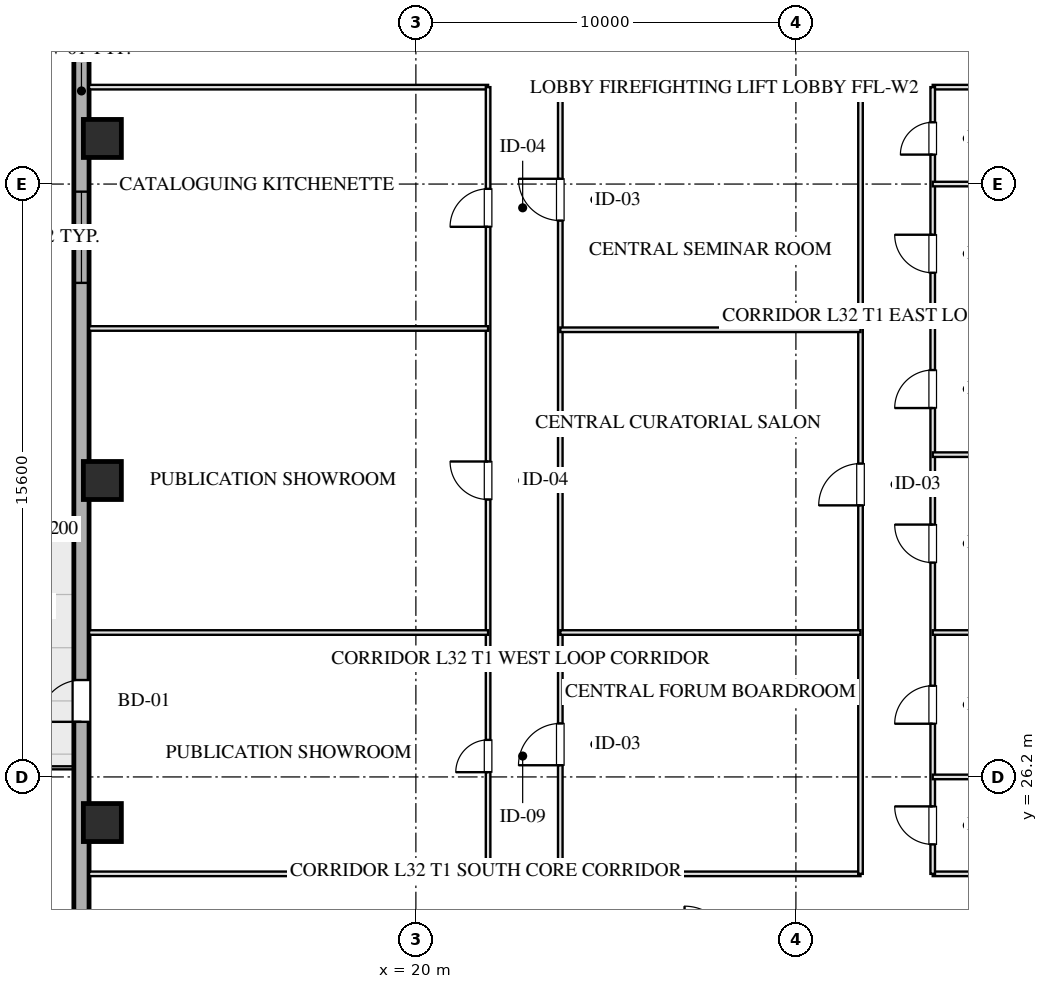
"""IFC4 building model, lengths in metres.
Left out: names, types, materials, properties, quantities, classifications, styles, units other than length and angle.
Written with IfcOpenShell. Run it as: python <this file> out.ifc"""

import sys

from ifc_helpers import new_model, si_unit, direction, frame, frame_2d, origin, origin_2d, place, context, subcontext, project, spatial, rectangle, hollow_rectangle, extrude, element, fill, save


model = new_model("IFC4")
c1 = context("Model", 3, precision=1e-05, world=origin(), true_north=direction((0.0, 1.0)))
c2 = subcontext(c1, "Body", "Model", "MODEL_VIEW")
j1 = project(units=[si_unit("LENGTHUNIT", "METRE"), si_unit("PLANEANGLEUNIT", "RADIAN")], contexts=[c1])
p1 = place(None, origin())
s1 = spatial("IfcSite", under=j1, at=p1, CompositionType="ELEMENT")
p2 = place(p1, origin())
s2 = spatial("IfcBuilding", under=s1, at=p2, CompositionType="ELEMENT")
p3 = place(p2, frame((0.0, 0.0, 124.2)))
s3 = spatial("IfcBuildingStorey", under=s2, at=p3, CompositionType="ELEMENT", Elevation=124.2)
for number, where, z_axis, x_axis in (
    (1, (11.75, 25.0, 0.0), (0.0, 0.0, 1.0), (1.0, 0.0, 0.0)),
    (2, (11.75, 34.0, 0.0), (0.0, 0.0, 1.0), (1.0, 0.0, 0.0)),
    (3, (11.75, 43.0, 0.0), (0.0, 0.0, 1.0), (1.0, 0.0, 0.0)),
):
    element("IfcColumn", number, at=place(p3, frame(where, z_axis=z_axis, x_axis=x_axis)), inside=s3, PredefinedType="COLUMN", context=c2, shape_type="SweptSolid", body=[
        extrude(hollow_rectangle(XDim=1.0, YDim=1.0, WallThickness=0.036, at=origin_2d()), origin(), (0.0, 0.0, 1.0), 3.451),
    ])
p4 = place(p3, frame((11.2, 9.0, 0.0), z_axis=(0.0, 0.0, 1.0), x_axis=(0.0, 1.0, 0.0)))
e4 = element("IfcWall", 4, at=p4, inside=s3, PredefinedType="SOLIDWALL", context=c2, shape_type="SweptSolid", body=[
    extrude(rectangle(XDim=50.0, YDim=0.4, at=frame_2d((25.0, 0.0))), origin(), (0.0, 0.0, 1.0), 2.61),
])
p5 = place(p4, frame((30.2, 0.0, 0.75)))
e5 = element("IfcOpeningElement", 5, at=p5, cuts=e4, PredefinedType="OPENING", context=c2, shape_type="SweptSolid", body=[
    extrude(rectangle(XDim=2.4, YDim=1.46, at=frame_2d((1.2, 0.73))), frame((0.0, 0.21, 0.0), z_axis=(0.0, -1.0, 0.0), x_axis=(1.0, 0.0, 0.0)), (0.0, 0.0, 1.0), 0.42),
])
p6 = place(p4, frame((18.65, 0.0, 0.0)))
e6 = element("IfcOpeningElement", 6, at=p6, cuts=e4, PredefinedType="OPENING", context=c2, shape_type="SweptSolid", body=[
    extrude(rectangle(XDim=1.1, YDim=2.15, at=frame_2d((0.55, 1.075))), frame((0.0, 0.21, 0.0), z_axis=(0.0, -1.0, 0.0), x_axis=(1.0, 0.0, 0.0)), (0.0, 0.0, 1.0), 0.42),
])
p7 = place(p3, frame((11.4, 23.65, 0.0), z_axis=(0.0, 0.0, 1.0), x_axis=(1.0, 0.0, 0.0)))
e7 = element("IfcWall", 7, at=p7, inside=s3, PredefinedType="PARTITIONING", context=c2, shape_type="SweptSolid", body=[
    extrude(rectangle(XDim=10.5, YDim=0.12, at=frame_2d((5.25, 0.0))), origin(), (0.0, 0.0, 1.0), 3.175),
])
p8 = place(p3, frame((23.8, 23.65, 0.0), z_axis=(0.0, 0.0, 1.0), x_axis=(1.0, 0.0, 0.0)))
e8 = element("IfcWall", 8, at=p8, inside=s3, PredefinedType="PARTITIONING", context=c2, shape_type="SweptSolid", body=[
    extrude(rectangle(XDim=7.9, YDim=0.12, at=frame_2d((3.95, 0.0))), origin(), (0.0, 0.0, 1.0), 3.175),
])
p9 = place(p3, frame((33.6, 23.65, 0.0), z_axis=(0.0, 0.0, 1.0), x_axis=(1.0, 0.0, 0.0)))
e9 = element("IfcWall", 9, at=p9, inside=s3, PredefinedType="PARTITIONING", context=c2, shape_type="SweptSolid", body=[
    extrude(rectangle(XDim=15.0, YDim=0.12, at=frame_2d((7.5, 0.0))), origin(), (0.0, 0.0, 1.0), 3.175),
])
p10 = place(p3, frame((11.4, 44.35, 0.0), z_axis=(0.0, 0.0, 1.0), x_axis=(1.0, 0.0, 0.0)))
e10 = element("IfcWall", 10, at=p10, inside=s3, PredefinedType="PARTITIONING", context=c2, shape_type="SweptSolid", body=[
    extrude(rectangle(XDim=10.5, YDim=0.12, at=frame_2d((5.25, 0.0))), origin(), (0.0, 0.0, 1.0), 3.175),
])
p11 = place(p3, frame((23.8, 44.35, 0.0), z_axis=(0.0, 0.0, 1.0), x_axis=(1.0, 0.0, 0.0)))
e11 = element("IfcWall", 11, at=p11, inside=s3, PredefinedType="PARTITIONING", context=c2, shape_type="SweptSolid", body=[
    extrude(rectangle(XDim=7.9, YDim=0.12, at=frame_2d((3.95, 0.0))), origin(), (0.0, 0.0, 1.0), 3.175),
])
p12 = place(p3, frame((33.6, 44.35, 0.0), z_axis=(0.0, 0.0, 1.0), x_axis=(1.0, 0.0, 0.0)))
e12 = element("IfcWall", 12, at=p12, inside=s3, PredefinedType="PARTITIONING", context=c2, shape_type="SweptSolid", body=[
    extrude(rectangle(XDim=15.0, YDim=0.12, at=frame_2d((7.5, 0.0))), origin(), (0.0, 0.0, 1.0), 3.175),
])
p13 = place(p3, frame((21.9, 23.65, 0.0), z_axis=(0.0, 0.0, 1.0), x_axis=(0.0, 1.0, 0.0)))
e13 = element("IfcWall", 13, at=p13, inside=s3, PredefinedType="PARTITIONING", context=c2, shape_type="SweptSolid", body=[
    extrude(rectangle(XDim=20.7, YDim=0.12, at=frame_2d((10.35, 0.0))), origin(), (0.0, 0.0, 1.0), 3.175),
])
p14 = place(p13, frame((2.675, 0.0, 0.0)))
e14 = element("IfcOpeningElement", 14, at=p14, cuts=e13, PredefinedType="OPENING", context=c2, shape_type="SweptSolid", body=[
    extrude(rectangle(XDim=0.85, YDim=2.05, at=frame_2d((0.425, 1.025))), frame((0.0, 0.07, 0.0), z_axis=(0.0, -1.0, 0.0), x_axis=(1.0, 0.0, 0.0)), (0.0, 0.0, 1.0), 0.14),
])
p15 = place(p13, frame((9.85, 0.0, 0.0)))
e15 = element("IfcOpeningElement", 15, at=p15, cuts=e13, PredefinedType="OPENING", context=c2, shape_type="SweptSolid", body=[
    extrude(rectangle(XDim=1.0, YDim=2.05, at=frame_2d((0.5, 1.025))), frame((0.0, 0.07, 0.0), z_axis=(0.0, -1.0, 0.0), x_axis=(1.0, 0.0, 0.0)), (0.0, 0.0, 1.0), 0.14),
])
p16 = place(p13, frame((17.025, 0.0, 0.0)))
e16 = element("IfcOpeningElement", 16, at=p16, cuts=e13, PredefinedType="OPENING", context=c2, shape_type="SweptSolid", body=[
    extrude(rectangle(XDim=1.0, YDim=2.05, at=frame_2d((0.5, 1.025))), frame((0.0, 0.07, 0.0), z_axis=(0.0, -1.0, 0.0), x_axis=(1.0, 0.0, 0.0)), (0.0, 0.0, 1.0), 0.14),
])
p17 = place(p3, frame((23.8, 23.65, 0.0), z_axis=(0.0, 0.0, 1.0), x_axis=(0.0, 1.0, 0.0)))
e17 = element("IfcWall", 17, at=p17, inside=s3, PredefinedType="PARTITIONING", context=c2, shape_type="SweptSolid", body=[
    extrude(rectangle(XDim=20.7, YDim=0.12, at=frame_2d((10.35, 0.0))), origin(), (0.0, 0.0, 1.0), 3.175),
])
p18 = place(p17, frame((2.857, 0.0, 0.0)))
e18 = element("IfcOpeningElement", 18, at=p18, cuts=e17, PredefinedType="OPENING", context=c2, shape_type="SweptSolid", body=[
    extrude(rectangle(XDim=1.1, YDim=2.05, at=frame_2d((0.55, 1.025))), frame((0.0, 0.07, 0.0), z_axis=(0.0, -1.0, 0.0), x_axis=(1.0, 0.0, 0.0)), (0.0, 0.0, 1.0), 0.14),
])
p19 = place(p17, frame((17.189, 0.0, 0.0)))
e19 = element("IfcOpeningElement", 19, at=p19, cuts=e17, PredefinedType="OPENING", context=c2, shape_type="SweptSolid", body=[
    extrude(rectangle(XDim=1.1, YDim=2.05, at=frame_2d((0.55, 1.025))), frame((0.0, 0.07, 0.0), z_axis=(0.0, -1.0, 0.0), x_axis=(1.0, 0.0, 0.0)), (0.0, 0.0, 1.0), 0.14),
])
p20 = place(p3, frame((31.7, 23.65, 0.0), z_axis=(0.0, 0.0, 1.0), x_axis=(0.0, 1.0, 0.0)))
e20 = element("IfcWall", 20, at=p20, inside=s3, PredefinedType="PARTITIONING", context=c2, shape_type="SweptSolid", body=[
    extrude(rectangle(XDim=20.7, YDim=0.12, at=frame_2d((10.35, 0.0))), origin(), (0.0, 0.0, 1.0), 3.175),
])
p21 = place(p20, frame((9.696, 0.0, 0.0)))
e21 = element("IfcOpeningElement", 21, at=p21, cuts=e20, PredefinedType="OPENING", context=c2, shape_type="SweptSolid", body=[
    extrude(rectangle(XDim=1.1, YDim=2.05, at=frame_2d((0.55, 1.025))), frame((0.0, 0.07, 0.0), z_axis=(0.0, -1.0, 0.0), x_axis=(1.0, 0.0, 0.0)), (0.0, 0.0, 1.0), 0.14),
])
p22 = place(p3, frame((33.6, 23.65, 0.0), z_axis=(0.0, 0.0, 1.0), x_axis=(0.0, 1.0, 0.0)))
e22 = element("IfcWall", 22, at=p22, inside=s3, PredefinedType="PARTITIONING", context=c2, shape_type="SweptSolid", body=[
    extrude(rectangle(XDim=20.7, YDim=0.12, at=frame_2d((10.35, 0.0))), origin(), (0.0, 0.0, 1.0), 3.175),
])
p23 = place(p22, frame((0.775, 0.0, 0.0)))
e23 = element("IfcOpeningElement", 23, at=p23, cuts=e22, PredefinedType="OPENING", context=c2, shape_type="SweptSolid", body=[
    extrude(rectangle(XDim=1.0, YDim=2.05, at=frame_2d((0.5, 1.025))), frame((0.0, 0.07, 0.0), z_axis=(0.0, -1.0, 0.0), x_axis=(1.0, 0.0, 0.0)), (0.0, 0.0, 1.0), 0.14),
])
p24 = place(p22, frame((3.95, 0.0, 0.0)))
e24 = element("IfcOpeningElement", 24, at=p24, cuts=e22, PredefinedType="OPENING", context=c2, shape_type="SweptSolid", body=[
    extrude(rectangle(XDim=1.0, YDim=2.05, at=frame_2d((0.5, 1.025))), frame((0.0, 0.07, 0.0), z_axis=(0.0, -1.0, 0.0), x_axis=(1.0, 0.0, 0.0)), (0.0, 0.0, 1.0), 0.14),
])
p25 = place(p22, frame((8.19, 0.0, 0.0)))
e25 = element("IfcOpeningElement", 25, at=p25, cuts=e22, PredefinedType="OPENING", context=c2, shape_type="SweptSolid", body=[
    extrude(rectangle(XDim=1.0, YDim=2.05, at=frame_2d((0.5, 1.025))), frame((0.0, 0.07, 0.0), z_axis=(0.0, -1.0, 0.0), x_axis=(1.0, 0.0, 0.0)), (0.0, 0.0, 1.0), 0.14),
])
p26 = place(p22, frame((12.257, 0.0, 0.0)))
e26 = element("IfcOpeningElement", 26, at=p26, cuts=e22, PredefinedType="OPENING", context=c2, shape_type="SweptSolid", body=[
    extrude(rectangle(XDim=1.0, YDim=2.05, at=frame_2d((0.5, 1.025))), frame((0.0, 0.07, 0.0), z_axis=(0.0, -1.0, 0.0), x_axis=(1.0, 0.0, 0.0)), (0.0, 0.0, 1.0), 0.14),
])
p27 = place(p22, frame((15.816, 0.0, 0.0)))
e27 = element("IfcOpeningElement", 27, at=p27, cuts=e22, PredefinedType="OPENING", context=c2, shape_type="SweptSolid", body=[
    extrude(rectangle(XDim=1.0, YDim=2.05, at=frame_2d((0.5, 1.025))), frame((0.0, 0.07, 0.0), z_axis=(0.0, -1.0, 0.0), x_axis=(1.0, 0.0, 0.0)), (0.0, 0.0, 1.0), 0.14),
])
p28 = place(p22, frame((18.925, 0.0, 0.0)))
e28 = element("IfcOpeningElement", 28, at=p28, cuts=e22, PredefinedType="OPENING", context=c2, shape_type="SweptSolid", body=[
    extrude(rectangle(XDim=0.85, YDim=2.05, at=frame_2d((0.425, 1.025))), frame((0.0, 0.07, 0.0), z_axis=(0.0, -1.0, 0.0), x_axis=(1.0, 0.0, 0.0)), (0.0, 0.0, 1.0), 0.14),
])
for number, where, z_axis, x_axis in (
    (29, (23.8, 30.0, 0.0), (0.0, 0.0, 1.0), (1.0, 0.0, 0.0)),
    (30, (23.8, 37.966, 0.0), (0.0, 0.0, 1.0), (1.0, 0.0, 0.0)),
):
    element("IfcWall", number, at=place(p3, frame(where, z_axis=z_axis, x_axis=x_axis)), inside=s3, PredefinedType="PARTITIONING", context=c2, shape_type="SweptSolid", body=[
        extrude(rectangle(XDim=7.9, YDim=0.12, at=frame_2d((3.95, 0.0))), origin(), (0.0, 0.0, 1.0), 3.175),
    ])
for number, where, z_axis, x_axis in (
    (31, (11.4, 30.0, 0.0), (0.0, 0.0, 1.0), (1.0, 0.0, 0.0)),
    (32, (11.4, 38.0, 0.0), (0.0, 0.0, 1.0), (1.0, 0.0, 0.0)),
):
    element("IfcWall", number, at=place(p3, frame(where, z_axis=z_axis, x_axis=x_axis)), inside=s3, PredefinedType="PARTITIONING", context=c2, shape_type="SweptSolid", body=[
        extrude(rectangle(XDim=10.5, YDim=0.12, at=frame_2d((5.25, 0.0))), origin(), (0.0, 0.0, 1.0), 3.175),
    ])
for number, where, z_axis, x_axis in (
    (33, (33.6, 26.2, 0.0), (0.0, 0.0, 1.0), (1.0, 0.0, 0.0)),
    (34, (33.6, 30.0, 0.0), (0.0, 0.0, 1.0), (1.0, 0.0, 0.0)),
    (35, (33.6, 34.68, 0.0), (0.0, 0.0, 1.0), (1.0, 0.0, 0.0)),
    (36, (33.6, 38.133, 0.0), (0.0, 0.0, 1.0), (1.0, 0.0, 0.0)),
    (37, (33.6, 41.8, 0.0), (0.0, 0.0, 1.0), (1.0, 0.0, 0.0)),
):
    element("IfcWall", number, at=place(p3, frame(where, z_axis=z_axis, x_axis=x_axis)), inside=s3, PredefinedType="PARTITIONING", context=c2, shape_type="SweptSolid", body=[
        extrude(rectangle(XDim=15.0, YDim=0.12, at=frame_2d((7.5, 0.0))), origin(), (0.0, 0.0, 1.0), 3.175),
    ])
p29 = place(p5, origin())
e38 = element("IfcWindow", 38, at=p29, inside=s3, PartitioningType="TRIPLE_PANEL_VERTICAL", PredefinedType="WINDOW", context=c2, shape_type="SweptSolid", body=[
    extrude(rectangle(XDim=2.4, YDim=1.46, at=frame_2d((1.2, 0.73))), frame((0.0, 0.03, 0.0), z_axis=(0.0, -1.0, 0.0), x_axis=(1.0, 0.0, 0.0)), (0.0, 0.0, 1.0), 0.06),
])
fill(e5, e38)
p30 = place(p6, origin())
e39 = element("IfcDoor", 39, at=p30, inside=s3, OperationType="SINGLE_SWING_LEFT", PredefinedType="DOOR", context=c2, shape_type="SweptSolid", body=[
    extrude(rectangle(XDim=1.1, YDim=2.15, at=frame_2d((0.55, 1.075))), frame((0.0, 0.025, 0.0), z_axis=(0.0, -1.0, 0.0), x_axis=(1.0, 0.0, 0.0)), (0.0, 0.0, 1.0), 0.05),
])
fill(e6, e39)
p31 = place(p14, origin())
e40 = element("IfcDoor", 40, at=p31, inside=s3, OperationType="SINGLE_SWING_LEFT", PredefinedType="DOOR", context=c2, shape_type="SweptSolid", body=[
    extrude(rectangle(XDim=0.85, YDim=2.05, at=frame_2d((0.425, 1.025))), frame((0.0, 0.025, 0.0), z_axis=(0.0, -1.0, 0.0), x_axis=(1.0, 0.0, 0.0)), (0.0, 0.0, 1.0), 0.05),
])
fill(e14, e40)
p32 = place(p15, origin())
e41 = element("IfcDoor", 41, at=p32, inside=s3, OperationType="SINGLE_SWING_RIGHT", PredefinedType="DOOR", context=c2, shape_type="SweptSolid", body=[
    extrude(rectangle(XDim=1.0, YDim=2.05, at=frame_2d((0.5, 1.025))), frame((0.0, 0.025, 0.0), z_axis=(0.0, -1.0, 0.0), x_axis=(1.0, 0.0, 0.0)), (0.0, 0.0, 1.0), 0.05),
])
fill(e15, e41)
p33 = place(p16, origin())
e42 = element("IfcDoor", 42, at=p33, inside=s3, OperationType="SINGLE_SWING_LEFT", PredefinedType="DOOR", context=c2, shape_type="SweptSolid", body=[
    extrude(rectangle(XDim=1.0, YDim=2.05, at=frame_2d((0.5, 1.025))), frame((0.0, 0.025, 0.0), z_axis=(0.0, -1.0, 0.0), x_axis=(1.0, 0.0, 0.0)), (0.0, 0.0, 1.0), 0.05),
])
fill(e16, e42)
p34 = place(p18, origin())
e43 = element("IfcDoor", 43, at=p34, inside=s3, OperationType="SINGLE_SWING_LEFT", PredefinedType="DOOR", context=c2, shape_type="SweptSolid", body=[
    extrude(rectangle(XDim=1.1, YDim=2.05, at=frame_2d((0.55, 1.025))), frame((0.0, 0.025, 0.0), z_axis=(0.0, -1.0, 0.0), x_axis=(1.0, 0.0, 0.0)), (0.0, 0.0, 1.0), 0.05),
])
fill(e18, e43)
p35 = place(p19, origin())
e44 = element("IfcDoor", 44, at=p35, inside=s3, OperationType="SINGLE_SWING_RIGHT", PredefinedType="DOOR", context=c2, shape_type="SweptSolid", body=[
    extrude(rectangle(XDim=1.1, YDim=2.05, at=frame_2d((0.55, 1.025))), frame((0.0, 0.025, 0.0), z_axis=(0.0, -1.0, 0.0), x_axis=(1.0, 0.0, 0.0)), (0.0, 0.0, 1.0), 0.05),
])
fill(e19, e44)
p36 = place(p21, origin())
e45 = element("IfcDoor", 45, at=p36, inside=s3, OperationType="SINGLE_SWING_LEFT", PredefinedType="DOOR", context=c2, shape_type="SweptSolid", body=[
    extrude(rectangle(XDim=1.1, YDim=2.05, at=frame_2d((0.55, 1.025))), frame((0.0, 0.025, 0.0), z_axis=(0.0, -1.0, 0.0), x_axis=(1.0, 0.0, 0.0)), (0.0, 0.0, 1.0), 0.05),
])
fill(e21, e45)
p37 = place(p23, origin())
e46 = element("IfcDoor", 46, at=p37, inside=s3, OperationType="SINGLE_SWING_RIGHT", PredefinedType="DOOR", context=c2, shape_type="SweptSolid", body=[
    extrude(rectangle(XDim=1.0, YDim=2.05, at=frame_2d((0.5, 1.025))), frame((0.0, 0.025, 0.0), z_axis=(0.0, -1.0, 0.0), x_axis=(1.0, 0.0, 0.0)), (0.0, 0.0, 1.0), 0.05),
])
fill(e23, e46)
p38 = place(p24, origin())
e47 = element("IfcDoor", 47, at=p38, inside=s3, OperationType="SINGLE_SWING_LEFT", PredefinedType="DOOR", context=c2, shape_type="SweptSolid", body=[
    extrude(rectangle(XDim=1.0, YDim=2.05, at=frame_2d((0.5, 1.025))), frame((0.0, 0.025, 0.0), z_axis=(0.0, -1.0, 0.0), x_axis=(1.0, 0.0, 0.0)), (0.0, 0.0, 1.0), 0.05),
])
fill(e24, e47)
p39 = place(p25, origin())
e48 = element("IfcDoor", 48, at=p39, inside=s3, OperationType="SINGLE_SWING_RIGHT", PredefinedType="DOOR", context=c2, shape_type="SweptSolid", body=[
    extrude(rectangle(XDim=1.0, YDim=2.05, at=frame_2d((0.5, 1.025))), frame((0.0, 0.025, 0.0), z_axis=(0.0, -1.0, 0.0), x_axis=(1.0, 0.0, 0.0)), (0.0, 0.0, 1.0), 0.05),
])
fill(e25, e48)
p40 = place(p26, origin())
e49 = element("IfcDoor", 49, at=p40, inside=s3, OperationType="SINGLE_SWING_LEFT", PredefinedType="DOOR", context=c2, shape_type="SweptSolid", body=[
    extrude(rectangle(XDim=1.0, YDim=2.05, at=frame_2d((0.5, 1.025))), frame((0.0, 0.025, 0.0), z_axis=(0.0, -1.0, 0.0), x_axis=(1.0, 0.0, 0.0)), (0.0, 0.0, 1.0), 0.05),
])
fill(e26, e49)
p41 = place(p27, origin())
e50 = element("IfcDoor", 50, at=p41, inside=s3, OperationType="SINGLE_SWING_RIGHT", PredefinedType="DOOR", context=c2, shape_type="SweptSolid", body=[
    extrude(rectangle(XDim=1.0, YDim=2.05, at=frame_2d((0.5, 1.025))), frame((0.0, 0.025, 0.0), z_axis=(0.0, -1.0, 0.0), x_axis=(1.0, 0.0, 0.0)), (0.0, 0.0, 1.0), 0.05),
])
fill(e27, e50)
p42 = place(p28, origin())
e51 = element("IfcDoor", 51, at=p42, inside=s3, OperationType="SINGLE_SWING_LEFT", PredefinedType="DOOR", context=c2, shape_type="SweptSolid", body=[
    extrude(rectangle(XDim=0.85, YDim=2.05, at=frame_2d((0.425, 1.025))), frame((0.0, 0.025, 0.0), z_axis=(0.0, -1.0, 0.0), x_axis=(1.0, 0.0, 0.0)), (0.0, 0.0, 1.0), 0.05),
])
fill(e28, e51)
save(model, sys.argv[1])
